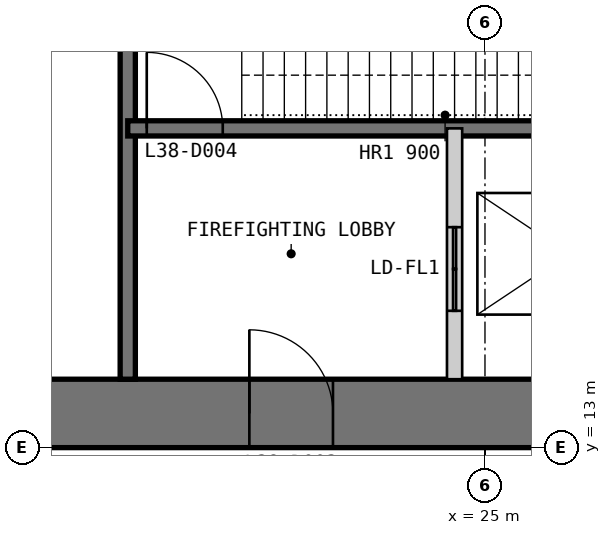
"""IFC4 building model, lengths in metres.
Left out: names, types, materials, properties, quantities, classifications, styles, units other than length and angle.
Written with IfcOpenShell. Run it as: python <this file> out.ifc"""

import sys

from ifc_helpers import new_model, si_unit, direction, frame, frame_2d, origin, place, context, subcontext, project, spatial, polyline, rectangle, outline, extrude, element, fill, save


model = new_model("IFC4")
c1 = context("Model", 3, precision=1e-05, world=origin(), true_north=direction((0.0, 1.0)))
c2 = subcontext(c1, "Body", "Model", "MODEL_VIEW")
j1 = project(units=[si_unit("LENGTHUNIT", "METRE"), si_unit("PLANEANGLEUNIT", "RADIAN")], contexts=[c1])
p1 = place(None, origin())
s1 = spatial("IfcSite", under=j1, at=p1, CompositionType="ELEMENT")
p2 = place(p1, origin())
s2 = spatial("IfcBuilding", under=s1, at=p2, CompositionType="ELEMENT")
p3 = place(p2, frame((0.0, 0.0, 162.4)))
s3 = spatial("IfcBuildingStorey", under=s2, at=p3, CompositionType="ELEMENT", Elevation=162.4)
p4 = place(p3, frame((13.0, 13.45, 0.0), z_axis=(0.0, 0.0, 1.0), x_axis=(1.0, 0.0, 0.0)))
e1 = element("IfcWall", 1, at=p4, inside=s3, PredefinedType="SHEAR", context=c2, shape_type="SweptSolid", body=[
    extrude(outline(polyline([(0.0, -0.45), (24.0, -0.45), (23.1, 0.45), (0.9, 0.45), (0.0, -0.45)])), origin(), (0.0, 0.0, 1.0), 6.0),
])
p5 = place(p4, frame((4.9, 0.0, 0.0)))
e2 = element("IfcOpeningElement", 2, at=p5, cuts=e1, PredefinedType="OPENING", context=c2, shape_type="SweptSolid", body=[
    extrude(rectangle(XDim=1.0, YDim=2.2, at=frame_2d((0.5, 1.1))), frame((0.0, 0.46, 0.0), z_axis=(0.0, -1.0, 0.0), x_axis=(1.0, 0.0, 0.0)), (0.0, 0.0, 1.0), 0.92),
])
p6 = place(p4, frame((8.9, 0.0, 0.0)))
e3 = element("IfcOpeningElement", 3, at=p6, cuts=e1, PredefinedType="OPENING", context=c2, shape_type="SweptSolid", body=[
    extrude(rectangle(XDim=1.1, YDim=2.2, at=frame_2d((0.55, 1.1))), frame((0.0, 0.46, 0.0), z_axis=(0.0, -1.0, 0.0), x_axis=(1.0, 0.0, 0.0)), (0.0, 0.0, 1.0), 0.92),
])
p7 = place(p4, frame((15.05, 0.0, 0.0)))
e4 = element("IfcOpeningElement", 4, at=p7, cuts=e1, PredefinedType="OPENING", context=c2, shape_type="SweptSolid", body=[
    extrude(rectangle(XDim=0.9, YDim=2.2, at=frame_2d((0.45, 1.1))), frame((0.0, 0.46, 0.0), z_axis=(0.0, -1.0, 0.0), x_axis=(1.0, 0.0, 0.0)), (0.0, 0.0, 1.0), 0.92),
])
p8 = place(p4, frame((17.9, 0.0, 0.0)))
e5 = element("IfcOpeningElement", 5, at=p8, cuts=e1, PredefinedType="OPENING", context=c2, shape_type="SweptSolid", body=[
    extrude(rectangle(XDim=1.0, YDim=2.2, at=frame_2d((0.5, 1.1))), frame((0.0, 0.46, 0.0), z_axis=(0.0, -1.0, 0.0), x_axis=(1.0, 0.0, 0.0)), (0.0, 0.0, 1.0), 0.92),
])
p9 = place(p4, frame((21.4, 0.0, 0.0)))
e6 = element("IfcOpeningElement", 6, at=p9, cuts=e1, PredefinedType="OPENING", context=c2, shape_type="SweptSolid", body=[
    extrude(rectangle(XDim=1.0, YDim=2.2, at=frame_2d((0.5, 1.1))), frame((0.0, 0.46, 0.0), z_axis=(0.0, -1.0, 0.0), x_axis=(1.0, 0.0, 0.0)), (0.0, 0.0, 1.0), 0.92),
])
p10 = place(p3, frame((20.3, 13.9, 0.0), z_axis=(0.0, 0.0, 1.0), x_axis=(0.0, 1.0, 0.0)))
e7 = element("IfcWall", 7, at=p10, inside=s3, PredefinedType="SOLIDWALL", context=c2, shape_type="SweptSolid", body=[
    extrude(rectangle(XDim=16.1, YDim=0.2, at=frame_2d((8.05, 0.0))), origin(), (0.0, 0.0, 1.0), 5.8),
])
p11 = place(p3, frame((20.3, 17.2, 0.0), z_axis=(0.0, 0.0, 1.0), x_axis=(1.0, 0.0, 0.0)))
e8 = element("IfcWall", 8, at=p11, inside=s3, PredefinedType="SOLIDWALL", context=c2, shape_type="SweptSolid", body=[
    extrude(rectangle(XDim=9.4, YDim=0.2, at=frame_2d((4.7, 0.0))), origin(), (0.0, 0.0, 1.0), 5.8),
])
p12 = place(p11, frame((0.25, 0.0, 0.0)))
e9 = element("IfcOpeningElement", 9, at=p12, cuts=e8, PredefinedType="OPENING", context=c2, shape_type="SweptSolid", body=[
    extrude(rectangle(XDim=1.0, YDim=2.2, at=frame_2d((0.5, 1.1))), frame((0.0, 0.11, 0.0), z_axis=(0.0, -1.0, 0.0), x_axis=(1.0, 0.0, 0.0)), (0.0, 0.0, 1.0), 0.22),
])
p13 = place(p3, frame((24.6, 13.9, 0.0), z_axis=(0.0, 0.0, 1.0), x_axis=(0.0, 1.0, 0.0)))
e10 = element("IfcWall", 10, at=p13, inside=s3, PredefinedType="PARTITIONING", context=c2, shape_type="SweptSolid", body=[
    extrude(rectangle(XDim=3.3, YDim=0.2, at=frame_2d((1.65, 0.0))), origin(), (0.0, 0.0, 1.0), 5.8),
])
p14 = place(p13, frame((0.9, 0.0, 0.0)))
e11 = element("IfcOpeningElement", 11, at=p14, cuts=e10, PredefinedType="OPENING", context=c2, shape_type="SweptSolid", body=[
    extrude(rectangle(XDim=1.1, YDim=2.2, at=frame_2d((0.55, 1.1))), frame((0.0, 0.11, 0.0), z_axis=(0.0, -1.0, 0.0), x_axis=(1.0, 0.0, 0.0)), (0.0, 0.0, 1.0), 0.22),
])
p15 = place(p6, origin())
e12 = element("IfcDoor", 12, at=p15, inside=s3, OperationType="SINGLE_SWING_LEFT", PredefinedType="DOOR", context=c2, shape_type="SweptSolid", body=[
    extrude(rectangle(XDim=1.1, YDim=2.2, at=frame_2d((0.55, 1.1))), frame((0.0, 0.025, 0.0), z_axis=(0.0, -1.0, 0.0), x_axis=(1.0, 0.0, 0.0)), (0.0, 0.0, 1.0), 0.05),
    extrude(outline(polyline([(0.0, 0.0), (0.04, 0.0), (0.04, 2.16), (1.06, 2.16), (1.06, 0.0), (1.1, 0.0), (1.1, 2.2), (0.0, 2.2), (0.0, 0.0)])), frame((0.0, 0.3, 0.0), z_axis=(0.0, -1.0, 0.0), x_axis=(1.0, 0.0, 0.0)), (0.0, 0.0, 1.0), 0.6),
])
fill(e3, e12)
p16 = place(p12, origin())
e13 = element("IfcDoor", 13, at=p16, inside=s3, OperationType="SINGLE_SWING_LEFT", PredefinedType="DOOR", context=c2, shape_type="SweptSolid", body=[
    extrude(rectangle(XDim=1.0, YDim=2.2, at=frame_2d((0.5, 1.1))), frame((0.0, 0.025, 0.0), z_axis=(0.0, -1.0, 0.0), x_axis=(1.0, 0.0, 0.0)), (0.0, 0.0, 1.0), 0.05),
])
fill(e9, e13)
p17 = place(p14, origin())
e14 = element("IfcDoor", 14, at=p17, inside=s3, OperationType="DOUBLE_DOOR_SLIDING", PredefinedType="DOOR", context=c2, shape_type="SweptSolid", body=[
    extrude(rectangle(XDim=1.1, YDim=2.2, at=frame_2d((0.55, 1.1))), frame((0.0, 0.025, 0.0), z_axis=(0.0, -1.0, 0.0), x_axis=(1.0, 0.0, 0.0)), (0.0, 0.0, 1.0), 0.05),
])
fill(e11, e14)
save(model, sys.argv[1])
